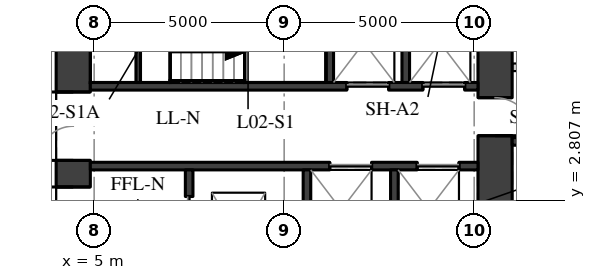
"""IFC4 building model, lengths in metres.
Left out: names, types, materials, properties, quantities, classifications, styles, units other than length and angle.
Written with IfcOpenShell. Run it as: python <this file> out.ifc"""

import sys

from ifc_helpers import new_model, si_unit, direction, frame, frame_2d, origin, place, context, subcontext, project, spatial, rectangle, extrude, element, fill, save


model = new_model("IFC4")
c1 = context("Model", 3, precision=1e-05, world=origin(), true_north=direction((0.0, 1.0)))
c2 = subcontext(c1, "Body", "Model", "MODEL_VIEW")
j1 = project(units=[si_unit("LENGTHUNIT", "METRE"), si_unit("PLANEANGLEUNIT", "RADIAN")], contexts=[c1])
p1 = place(None, origin())
s1 = spatial("IfcSite", under=j1, at=p1, CompositionType="ELEMENT")
p2 = place(p1, origin())
s2 = spatial("IfcBuilding", under=s1, at=p2, CompositionType="ELEMENT")
p3 = place(p2, frame((0.0, 0.0, 12.5)))
s3 = spatial("IfcBuildingStorey", under=s2, at=p3, CompositionType="ELEMENT", Elevation=12.5)
p4 = place(p3, frame((4.45, -11.1, 0.0), z_axis=(0.0, 0.0, 1.0), x_axis=(0.0, 1.0, 0.0)))
e1 = element("IfcWall", 1, at=p4, inside=s3, PredefinedType="SHEAR", context=c2, shape_type="SweptSolid", body=[
    extrude(rectangle(XDim=22.2, YDim=0.9, at=frame_2d((11.1, 0.0))), origin(), (0.0, 0.0, 1.0), 4.65),
])
p5 = place(p4, frame((2.35, 0.0, 0.0)))
e2 = element("IfcOpeningElement", 2, at=p5, cuts=e1, PredefinedType="OPENING", context=c2, shape_type="SweptSolid", body=[
    extrude(rectangle(XDim=1.5, YDim=2.1, at=frame_2d((0.75, 1.05))), frame((0.0, 0.46, 0.0), z_axis=(0.0, -1.0, 0.0), x_axis=(1.0, 0.0, 0.0)), (0.0, 0.0, 1.0), 0.92),
])
p6 = place(p4, frame((5.45, 0.0, 0.0)))
e3 = element("IfcOpeningElement", 3, at=p6, cuts=e1, PredefinedType="OPENING", context=c2, shape_type="SweptSolid", body=[
    extrude(rectangle(XDim=1.8, YDim=2.1, at=frame_2d((0.9, 1.05))), frame((0.0, 0.46, 0.0), z_axis=(0.0, -1.0, 0.0), x_axis=(1.0, 0.0, 0.0)), (0.0, 0.0, 1.0), 0.92),
])
p7 = place(p4, frame((7.95, 0.0, 0.0)))
e4 = element("IfcOpeningElement", 4, at=p7, cuts=e1, PredefinedType="OPENING", context=c2, shape_type="SweptSolid", body=[
    extrude(rectangle(XDim=1.1, YDim=2.1, at=frame_2d((0.55, 1.05))), frame((0.0, 0.46, 0.0), z_axis=(0.0, -1.0, 0.0), x_axis=(1.0, 0.0, 0.0)), (0.0, 0.0, 1.0), 0.92),
])
p8 = place(p4, frame((10.6, 0.0, 0.0)))
e5 = element("IfcOpeningElement", 5, at=p8, cuts=e1, PredefinedType="OPENING", context=c2, shape_type="SweptSolid", body=[
    extrude(rectangle(XDim=1.0, YDim=2.1, at=frame_2d((0.5, 1.05))), frame((0.0, 0.46, 0.0), z_axis=(0.0, -1.0, 0.0), x_axis=(1.0, 0.0, 0.0)), (0.0, 0.0, 1.0), 0.92),
])
p9 = place(p4, frame((13.15, 0.0, 0.0)))
e6 = element("IfcOpeningElement", 6, at=p9, cuts=e1, PredefinedType="OPENING", context=c2, shape_type="SweptSolid", body=[
    extrude(rectangle(XDim=1.1, YDim=2.1, at=frame_2d((0.55, 1.05))), frame((0.0, 0.46, 0.0), z_axis=(0.0, -1.0, 0.0), x_axis=(1.0, 0.0, 0.0)), (0.0, 0.0, 1.0), 0.92),
])
p10 = place(p4, frame((14.95, 0.0, 0.0)))
e7 = element("IfcOpeningElement", 7, at=p10, cuts=e1, PredefinedType="OPENING", context=c2, shape_type="SweptSolid", body=[
    extrude(rectangle(XDim=1.8, YDim=2.1, at=frame_2d((0.9, 1.05))), frame((0.0, 0.46, 0.0), z_axis=(0.0, -1.0, 0.0), x_axis=(1.0, 0.0, 0.0)), (0.0, 0.0, 1.0), 0.92),
])
p11 = place(p4, frame((18.35, 0.0, 0.0)))
e8 = element("IfcOpeningElement", 8, at=p11, cuts=e1, PredefinedType="OPENING", context=c2, shape_type="SweptSolid", body=[
    extrude(rectangle(XDim=1.5, YDim=2.1, at=frame_2d((0.75, 1.05))), frame((0.0, 0.46, 0.0), z_axis=(0.0, -1.0, 0.0), x_axis=(1.0, 0.0, 0.0)), (0.0, 0.0, 1.0), 0.92),
])
p12 = place(p3, frame((15.55, -11.1, 0.0), z_axis=(0.0, 0.0, 1.0), x_axis=(0.0, 1.0, 0.0)))
e9 = element("IfcWall", 9, at=p12, inside=s3, PredefinedType="SHEAR", context=c2, shape_type="SweptSolid", body=[
    extrude(rectangle(XDim=22.2, YDim=0.9, at=frame_2d((11.1, 0.0))), origin(), (0.0, 0.0, 1.0), 4.65),
])
p13 = place(p12, frame((15.6, 0.0, 0.0)))
e10 = element("IfcOpeningElement", 10, at=p13, cuts=e9, PredefinedType="OPENING", context=c2, shape_type="SweptSolid", body=[
    extrude(rectangle(XDim=1.0, YDim=2.1, at=frame_2d((0.5, 1.05))), frame((0.0, 0.46, 0.0), z_axis=(0.0, -1.0, 0.0), x_axis=(1.0, 0.0, 0.0)), (0.0, 0.0, 1.0), 0.92),
])
p14 = place(p12, frame((5.6, 0.0, 0.0)))
e11 = element("IfcOpeningElement", 11, at=p14, cuts=e9, PredefinedType="OPENING", context=c2, shape_type="SweptSolid", body=[
    extrude(rectangle(XDim=1.0, YDim=2.1, at=frame_2d((0.5, 1.05))), frame((0.0, 0.46, 0.0), z_axis=(0.0, -1.0, 0.0), x_axis=(1.0, 0.0, 0.0)), (0.0, 0.0, 1.0), 0.92),
])
p15 = place(p3, frame((4.9, 5.8, 0.0), z_axis=(0.0, 0.0, 1.0), x_axis=(1.0, 0.0, 0.0)))
e12 = element("IfcWall", 12, at=p15, inside=s3, PredefinedType="SHEAR", context=c2, shape_type="SweptSolid", body=[
    extrude(rectangle(XDim=10.2, YDim=0.2, at=frame_2d((5.1, 0.0))), origin(), (0.0, 0.0, 1.0), 4.65),
])
p16 = place(p15, frame((6.75, 0.0, 0.0)))
e13 = element("IfcOpeningElement", 13, at=p16, cuts=e12, PredefinedType="OPENING", context=c2, shape_type="SweptSolid", body=[
    extrude(rectangle(XDim=1.1, YDim=2.1, at=frame_2d((0.55, 1.05))), frame((0.0, 0.11, 0.0), z_axis=(0.0, -1.0, 0.0), x_axis=(1.0, 0.0, 0.0)), (0.0, 0.0, 1.0), 0.22),
])
p17 = place(p15, frame((8.75, 0.0, 0.0)))
e14 = element("IfcOpeningElement", 14, at=p17, cuts=e12, PredefinedType="OPENING", context=c2, shape_type="SweptSolid", body=[
    extrude(rectangle(XDim=1.1, YDim=2.1, at=frame_2d((0.55, 1.05))), frame((0.0, 0.11, 0.0), z_axis=(0.0, -1.0, 0.0), x_axis=(1.0, 0.0, 0.0)), (0.0, 0.0, 1.0), 0.22),
])
p18 = place(p3, frame((4.9, 3.7, 0.0), z_axis=(0.0, 0.0, 1.0), x_axis=(1.0, 0.0, 0.0)))
e15 = element("IfcWall", 15, at=p18, inside=s3, PredefinedType="SHEAR", context=c2, shape_type="SweptSolid", body=[
    extrude(rectangle(XDim=10.2, YDim=0.2, at=frame_2d((5.1, 0.0))), origin(), (0.0, 0.0, 1.0), 4.65),
])
p19 = place(p18, frame((6.3, 0.0, 0.0)))
e16 = element("IfcOpeningElement", 16, at=p19, cuts=e15, PredefinedType="OPENING", context=c2, shape_type="SweptSolid", body=[
    extrude(rectangle(XDim=1.1, YDim=2.1, at=frame_2d((0.55, 1.05))), frame((0.0, 0.11, 0.0), z_axis=(0.0, -1.0, 0.0), x_axis=(1.0, 0.0, 0.0)), (0.0, 0.0, 1.0), 0.22),
])
p20 = place(p18, frame((8.6, 0.0, 0.0)))
e17 = element("IfcOpeningElement", 17, at=p20, cuts=e15, PredefinedType="OPENING", context=c2, shape_type="SweptSolid", body=[
    extrude(rectangle(XDim=1.1, YDim=2.1, at=frame_2d((0.55, 1.05))), frame((0.0, 0.11, 0.0), z_axis=(0.0, -1.0, 0.0), x_axis=(1.0, 0.0, 0.0)), (0.0, 0.0, 1.0), 0.22),
])
for number, where, z_axis, x_axis in (
    (18, (11.2, 5.9, 0.0), (0.0, 0.0, 1.0), (0.0, 1.0, 0.0)),
    (19, (13.2, 5.9, 0.0), (0.0, 0.0, 1.0), (0.0, 1.0, 0.0)),
):
    element("IfcWall", number, at=place(p3, frame(where, z_axis=z_axis, x_axis=x_axis)), inside=s3, PredefinedType="SHEAR", context=c2, shape_type="SweptSolid", body=[
        extrude(rectangle(XDim=3.2, YDim=0.2, at=frame_2d((1.6, 0.0))), origin(), (0.0, 0.0, 1.0), 4.65),
    ])
p21 = place(p3, frame((7.5, 1.1, 0.0), z_axis=(0.0, 0.0, 1.0), x_axis=(0.0, 1.0, 0.0)))
e20 = element("IfcWall", 20, at=p21, inside=s3, PredefinedType="SHEAR", context=c2, shape_type="SweptSolid", body=[
    extrude(rectangle(XDim=2.5, YDim=0.2, at=frame_2d((1.25, 0.0))), origin(), (0.0, 0.0, 1.0), 4.65),
])
p22 = place(p21, frame((0.7, 0.0, 0.0)))
e21 = element("IfcOpeningElement", 21, at=p22, cuts=e20, PredefinedType="OPENING", context=c2, shape_type="SweptSolid", body=[
    extrude(rectangle(XDim=1.1, YDim=2.1, at=frame_2d((0.55, 1.05))), frame((0.0, 0.11, 0.0), z_axis=(0.0, -1.0, 0.0), x_axis=(1.0, 0.0, 0.0)), (0.0, 0.0, 1.0), 0.22),
])
for number, where, z_axis, x_axis in (
    (22, (10.6, 1.1, 0.0), (0.0, 0.0, 1.0), (0.0, 1.0, 0.0)),
    (23, (12.9, 1.1, 0.0), (0.0, 0.0, 1.0), (0.0, 1.0, 0.0)),
):
    element("IfcWall", number, at=place(p3, frame(where, z_axis=z_axis, x_axis=x_axis)), inside=s3, PredefinedType="SHEAR", context=c2, shape_type="SweptSolid", body=[
        extrude(rectangle(XDim=2.5, YDim=0.2, at=frame_2d((1.25, 0.0))), origin(), (0.0, 0.0, 1.0), 4.65),
    ])
p23 = place(p3, frame((6.16, 5.9, 0.0), z_axis=(0.0, 0.0, 1.0), x_axis=(0.0, 1.0, 0.0)))
e24 = element("IfcWall", 24, at=p23, inside=s3, PredefinedType="SHEAR", context=c2, shape_type="SweptSolid", body=[
    extrude(rectangle(XDim=3.2, YDim=0.12, at=frame_2d((1.6, 0.0))), origin(), (0.0, 0.0, 1.0), 2.29),
])
p24 = place(p23, frame((0.85, 0.0, 0.0)))
e25 = element("IfcOpeningElement", 25, at=p24, cuts=e24, PredefinedType="OPENING", context=c2, shape_type="SweptSolid", body=[
    extrude(rectangle(XDim=1.5, YDim=2.1, at=frame_2d((0.75, 1.05))), frame((0.0, 0.07, 0.0), z_axis=(0.0, -1.0, 0.0), x_axis=(1.0, 0.0, 0.0)), (0.0, 0.0, 1.0), 0.14),
])
p25 = place(p3, frame((16.0, 4.35, 0.0), z_axis=(0.0, 0.0, 1.0), x_axis=(1.0, 0.0, 0.0)))
e26 = element("IfcWall", 26, at=p25, inside=s3, PredefinedType="SHEAR", context=c2, shape_type="SweptSolid", body=[
    extrude(rectangle(XDim=2.3, YDim=0.2, at=frame_2d((1.15, 0.0))), origin(), (0.0, 0.0, 1.0), 4.65),
])
p26 = place(p3, frame((16.0, 6.3, 0.0), z_axis=(0.0, 0.0, 1.0), x_axis=(1.0, 0.0, 0.0)))
e27 = element("IfcWall", 27, at=p26, inside=s3, PredefinedType="PARTITIONING", context=c2, shape_type="SweptSolid", body=[
    extrude(rectangle(XDim=2.3, YDim=0.2, at=frame_2d((1.15, 0.0))), origin(), (0.0, 0.0, 1.0), 4.65),
])
p27 = place(p26, frame((0.3, 0.0, 0.0)))
e28 = element("IfcOpeningElement", 28, at=p27, cuts=e27, PredefinedType="OPENING", context=c2, shape_type="SweptSolid", body=[
    extrude(rectangle(XDim=0.9, YDim=2.1, at=frame_2d((0.45, 1.05))), frame((0.0, 0.11, 0.0), z_axis=(0.0, -1.0, 0.0), x_axis=(1.0, 0.0, 0.0)), (0.0, 0.0, 1.0), 0.22),
])
p28 = place(p9, origin())
e29 = element("IfcDoor", 29, at=p28, inside=s3, OperationType="SINGLE_SWING_RIGHT", PredefinedType="DOOR", context=c2, shape_type="SweptSolid", body=[
    extrude(rectangle(XDim=1.1, YDim=2.1, at=frame_2d((0.55, 1.05))), frame((0.0, 0.025, 0.0), z_axis=(0.0, -1.0, 0.0), x_axis=(1.0, 0.0, 0.0)), (0.0, 0.0, 1.0), 0.05),
])
fill(e6, e29)
p29 = place(p10, origin())
e30 = element("IfcDoor", 30, at=p29, inside=s3, OperationType="DOUBLE_DOOR_SINGLE_SWING", PredefinedType="DOOR", context=c2, shape_type="SweptSolid", body=[
    extrude(rectangle(XDim=1.8, YDim=2.1, at=frame_2d((0.9, 1.05))), frame((0.0, 0.025, 0.0), z_axis=(0.0, -1.0, 0.0), x_axis=(1.0, 0.0, 0.0)), (0.0, 0.0, 1.0), 0.05),
])
fill(e7, e30)
p30 = place(p16, origin())
e31 = element("IfcDoor", 31, at=p30, inside=s3, OperationType="DOUBLE_DOOR_SLIDING", PredefinedType="DOOR", context=c2, shape_type="SweptSolid", body=[
    extrude(rectangle(XDim=1.1, YDim=2.1, at=frame_2d((0.55, 1.05))), frame((0.0, 0.025, 0.0), z_axis=(0.0, -1.0, 0.0), x_axis=(1.0, 0.0, 0.0)), (0.0, 0.0, 1.0), 0.05),
])
fill(e13, e31)
p31 = place(p17, origin())
e32 = element("IfcDoor", 32, at=p31, inside=s3, OperationType="DOUBLE_DOOR_SLIDING", PredefinedType="DOOR", context=c2, shape_type="SweptSolid", body=[
    extrude(rectangle(XDim=1.1, YDim=2.1, at=frame_2d((0.55, 1.05))), frame((0.0, 0.025, 0.0), z_axis=(0.0, -1.0, 0.0), x_axis=(1.0, 0.0, 0.0)), (0.0, 0.0, 1.0), 0.05),
])
fill(e14, e32)
p32 = place(p19, origin())
e33 = element("IfcDoor", 33, at=p32, inside=s3, OperationType="DOUBLE_DOOR_SLIDING", PredefinedType="DOOR", context=c2, shape_type="SweptSolid", body=[
    extrude(rectangle(XDim=1.1, YDim=2.1, at=frame_2d((0.55, 1.05))), frame((0.0, 0.025, 0.0), z_axis=(0.0, -1.0, 0.0), x_axis=(1.0, 0.0, 0.0)), (0.0, 0.0, 1.0), 0.05),
])
fill(e16, e33)
p33 = place(p20, origin())
e34 = element("IfcDoor", 34, at=p33, inside=s3, OperationType="DOUBLE_DOOR_SLIDING", PredefinedType="DOOR", context=c2, shape_type="SweptSolid", body=[
    extrude(rectangle(XDim=1.1, YDim=2.1, at=frame_2d((0.55, 1.05))), frame((0.0, 0.025, 0.0), z_axis=(0.0, -1.0, 0.0), x_axis=(1.0, 0.0, 0.0)), (0.0, 0.0, 1.0), 0.05),
])
fill(e17, e34)
p34 = place(p22, origin())
e35 = element("IfcDoor", 35, at=p34, inside=s3, OperationType="DOUBLE_DOOR_SLIDING", PredefinedType="DOOR", context=c2, shape_type="SweptSolid", body=[
    extrude(rectangle(XDim=1.1, YDim=2.1, at=frame_2d((0.55, 1.05))), frame((0.0, 0.025, 0.0), z_axis=(0.0, -1.0, 0.0), x_axis=(1.0, 0.0, 0.0)), (0.0, 0.0, 1.0), 0.05),
])
fill(e21, e35)
p35 = place(p13, origin())
e36 = element("IfcDoor", 36, at=p35, inside=s3, OperationType="SINGLE_SWING_RIGHT", PredefinedType="DOOR", context=c2, shape_type="SweptSolid", body=[
    extrude(rectangle(XDim=1.0, YDim=2.1, at=frame_2d((0.5, 1.05))), frame((0.0, 0.025, 0.0), z_axis=(0.0, -1.0, 0.0), x_axis=(1.0, 0.0, 0.0)), (0.0, 0.0, 1.0), 0.05),
])
fill(e10, e36)
save(model, sys.argv[1])
